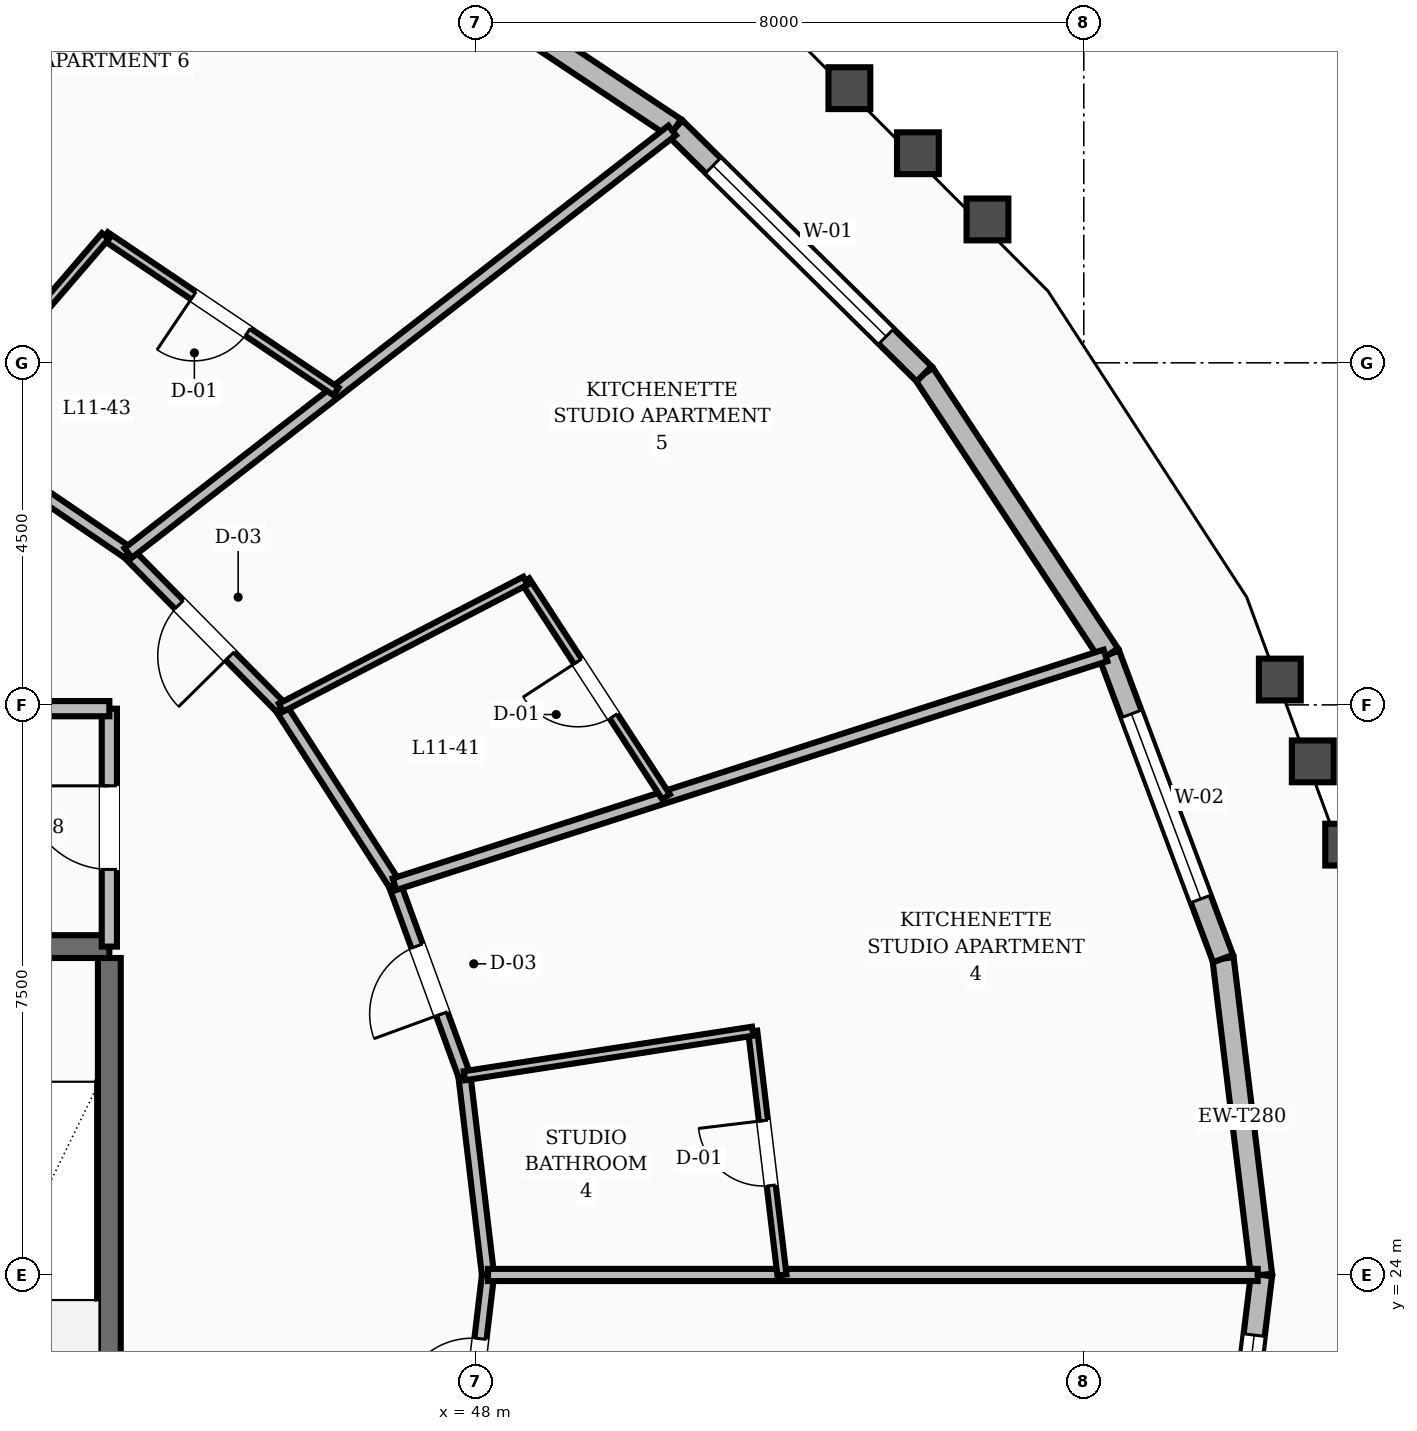
"""IFC4 building model, lengths in metres.
Left out: names, types, materials, properties, quantities, classifications, styles, units other than length and angle.
Written with IfcOpenShell. Run it as: python <this file> out.ifc"""

import sys

from ifc_helpers import new_model, si_unit, direction, frame, frame_2d, origin, place, context, subcontext, project, spatial, rectangle, extrude, element, fill, save


model = new_model("IFC4")
c1 = context("Model", 3, precision=1e-05, world=origin(), true_north=direction((0.0, 1.0)))
c2 = subcontext(c1, "Body", "Model", "MODEL_VIEW")
j1 = project(units=[si_unit("LENGTHUNIT", "METRE"), si_unit("PLANEANGLEUNIT", "RADIAN")], contexts=[c1])
p1 = place(None, origin())
s1 = spatial("IfcSite", under=j1, at=p1, CompositionType="ELEMENT")
p2 = place(p1, origin())
s2 = spatial("IfcBuilding", under=s1, at=p2, CompositionType="ELEMENT")
p3 = place(p2, frame((0.0, 0.0, 48.4)))
s3 = spatial("IfcBuildingStorey", under=s2, at=p3, CompositionType="ELEMENT", Elevation=48.4)
p4 = place(p3, frame((43.18, 19.43, 0.0), z_axis=(0.0, 0.0, 1.0), x_axis=(0.0, 1.0, 0.0)))
e1 = element("IfcWall", 1, at=p4, inside=s3, PredefinedType="SHEAR", context=c2, shape_type="SweptSolid", body=[
    extrude(rectangle(XDim=8.74, YDim=0.3, at=frame_2d((4.37, 0.0))), origin(), (0.0, 0.0, 1.0), 3.6),
])
p5 = place(p3, frame((39.58, 28.32, 0.0), z_axis=(0.0, 0.0, 1.0), x_axis=(1.0, 0.0, 0.0)))
e2 = element("IfcWall", 2, at=p5, inside=s3, PredefinedType="SHEAR", context=c2, shape_type="SweptSolid", body=[
    extrude(rectangle(XDim=3.6, YDim=0.3, at=frame_2d((1.8, 0.0))), origin(), (0.0, 0.0, 1.0), 3.6),
])
p6 = place(p5, frame((1.3, 0.0, 0.0)))
e3 = element("IfcOpeningElement", 3, at=p6, cuts=e2, PredefinedType="OPENING", context=c2, shape_type="SweptSolid", body=[
    extrude(rectangle(XDim=1.1, YDim=2.1, at=frame_2d((0.55, 1.05))), frame((0.0, 0.16, 0.0), z_axis=(0.0, -1.0, 0.0), x_axis=(1.0, 0.0, 0.0)), (0.0, 0.0, 1.0), 0.32),
])
p7 = place(p3, frame((58.338, 24.0, 0.0), z_axis=(0.0, 0.0, 1.0), x_axis=(-0.120687785898, 0.992690514881, 0.0)))
e4 = element("IfcWall", 4, at=p7, inside=s3, PredefinedType="STANDARD", context=c2, shape_type="SweptSolid", body=[
    extrude(rectangle(XDim=4.194, YDim=0.28, at=frame_2d((2.097, 0.0))), origin(), (0.0, 0.0, 1.0), 2.65),
])
p8 = place(p3, frame((57.832, 28.163, 0.0), z_axis=(0.0, 0.0, 1.0), x_axis=(-0.350647673381, 0.936507452802, 0.0)))
e5 = element("IfcWall", 5, at=p8, inside=s3, PredefinedType="STANDARD", context=c2, shape_type="SweptSolid", body=[
    extrude(rectangle(XDim=4.274, YDim=0.28, at=frame_2d((2.137, 0.0))), origin(), (0.0, 0.0, 1.0), 2.65),
])
p9 = place(p8, frame((0.837, 0.0, 0.8)))
e6 = element("IfcOpeningElement", 6, at=p9, cuts=e5, PredefinedType="OPENING", context=c2, shape_type="SweptSolid", body=[
    extrude(rectangle(XDim=2.6, YDim=1.65, at=frame_2d((1.3, 0.825))), frame((0.0, 0.15, 0.0), z_axis=(0.0, -1.0, 0.0), x_axis=(1.0, 0.0, 0.0)), (0.0, 0.0, 1.0), 0.3),
])
p10 = place(p3, frame((56.333, 32.166, 0.0), z_axis=(0.0, 0.0, 1.0), x_axis=(-0.550703673424, 0.834700823096, 0.0)))
e7 = element("IfcWall", 7, at=p10, inside=s3, PredefinedType="STANDARD", context=c2, shape_type="SweptSolid", body=[
    extrude(rectangle(XDim=4.419, YDim=0.28, at=frame_2d((2.21, 0.0))), origin(), (0.0, 0.0, 1.0), 2.65),
])
p11 = place(p3, frame((53.899, 35.855, 0.0), z_axis=(0.0, 0.0, 1.0), x_axis=(-0.711653949878, 0.70253018129, 0.0)))
e8 = element("IfcWall", 8, at=p11, inside=s3, PredefinedType="STANDARD", context=c2, shape_type="SweptSolid", body=[
    extrude(rectangle(XDim=4.603, YDim=0.28, at=frame_2d((2.301, 0.0))), origin(), (0.0, 0.0, 1.0), 2.65),
])
p12 = place(p11, frame((0.701, 0.0, 0.8)))
e9 = element("IfcOpeningElement", 9, at=p12, cuts=e8, PredefinedType="OPENING", context=c2, shape_type="SweptSolid", body=[
    extrude(rectangle(XDim=3.2, YDim=1.65, at=frame_2d((1.6, 0.825))), frame((0.0, 0.15, 0.0), z_axis=(0.0, -1.0, 0.0), x_axis=(1.0, 0.0, 0.0)), (0.0, 0.0, 1.0), 0.3),
])
p13 = place(p3, frame((50.624, 39.088, 0.0), z_axis=(0.0, 0.0, 1.0), x_axis=(-0.832723620408, 0.55368887655, 0.0)))
e10 = element("IfcWall", 10, at=p13, inside=s3, PredefinedType="STANDARD", context=c2, shape_type="SweptSolid", body=[
    extrude(rectangle(XDim=4.793, YDim=0.28, at=frame_2d((2.396, 0.0))), origin(), (0.0, 0.0, 1.0), 2.65),
])
p14 = place(p3, frame((57.832, 19.837, 0.0), z_axis=(0.0, 0.0, 1.0), x_axis=(0.120687785898, 0.992690514881, 0.0)))
e11 = element("IfcWall", 11, at=p14, inside=s3, PredefinedType="STANDARD", context=c2, shape_type="SweptSolid", body=[
    extrude(rectangle(XDim=4.194, YDim=0.28, at=frame_2d((2.097, 0.0))), origin(), (0.0, 0.0, 1.0), 2.65),
])
p15 = place(p14, frame((0.797, 0.0, 0.8)))
e12 = element("IfcOpeningElement", 12, at=p15, cuts=e11, PredefinedType="OPENING", context=c2, shape_type="SweptSolid", body=[
    extrude(rectangle(XDim=2.6, YDim=1.65, at=frame_2d((1.3, 0.825))), frame((0.0, 0.15, 0.0), z_axis=(0.0, -1.0, 0.0), x_axis=(1.0, 0.0, 0.0)), (0.0, 0.0, 1.0), 0.3),
])
p16 = place(p3, frame((43.18, 28.32, 0.0), z_axis=(0.0, 0.0, 1.0), x_axis=(0.0, 1.0, 0.0)))
e13 = element("IfcWall", 13, at=p16, inside=s3, PredefinedType="SOLIDWALL", context=c2, shape_type="SweptSolid", body=[
    extrude(rectangle(XDim=3.13, YDim=0.2, at=frame_2d((1.565, 0.0))), origin(), (0.0, 0.0, 1.0), 2.61),
])
p17 = place(p16, frame((1.015, 0.0, 0.0)))
e14 = element("IfcOpeningElement", 14, at=p17, cuts=e13, PredefinedType="OPENING", context=c2, shape_type="SweptSolid", body=[
    extrude(rectangle(XDim=1.1, YDim=2.1, at=frame_2d((0.55, 1.05))), frame((0.0, 0.11, 0.0), z_axis=(0.0, -1.0, 0.0), x_axis=(1.0, 0.0, 0.0)), (0.0, 0.0, 1.0), 0.22),
])
p18 = place(p3, frame((39.2, 31.45, 0.0), z_axis=(0.0, 0.0, 1.0), x_axis=(1.0, 0.0, 0.0)))
e15 = element("IfcWall", 15, at=p18, inside=s3, PredefinedType="SOLIDWALL", context=c2, shape_type="SweptSolid", body=[
    extrude(rectangle(XDim=3.98, YDim=0.2, at=frame_2d((1.99, 0.0))), origin(), (0.0, 0.0, 1.0), 2.61),
])
p19 = place(p3, frame((48.162, 24.0, 0.0), z_axis=(0.0, 0.0, 1.0), x_axis=(-0.117667763342, 0.993053018459, 0.0)))
e16 = element("IfcWall", 16, at=p19, inside=s3, PredefinedType="SOLIDWALL", context=c2, shape_type="SweptSolid", body=[
    extrude(rectangle(XDim=2.639, YDim=0.16, at=frame_2d((1.32, 0.0))), origin(), (0.0, 0.0, 1.0), 2.61),
])
p20 = place(p3, frame((47.852, 26.621, 0.0), z_axis=(0.0, 0.0, 1.0), x_axis=(-0.342882618672, 0.939378257047, 0.0)))
e17 = element("IfcWall", 17, at=p20, inside=s3, PredefinedType="SOLIDWALL", context=c2, shape_type="SweptSolid", body=[
    extrude(rectangle(XDim=2.683, YDim=0.16, at=frame_2d((1.341, 0.0))), origin(), (0.0, 0.0, 1.0), 2.61),
])
p21 = place(p20, frame((0.866, 0.0, 0.0)))
e18 = element("IfcOpeningElement", 18, at=p21, cuts=e17, PredefinedType="OPENING", context=c2, shape_type="SweptSolid", body=[
    extrude(rectangle(XDim=0.95, YDim=2.1, at=frame_2d((0.475, 1.05))), frame((0.0, 0.09, 0.0), z_axis=(0.0, -1.0, 0.0), x_axis=(1.0, 0.0, 0.0)), (0.0, 0.0, 1.0), 0.18),
])
p22 = place(p3, frame((46.932, 29.141, 0.0), z_axis=(0.0, 0.0, 1.0), x_axis=(-0.540891657444, 0.841092274907, 0.0)))
e19 = element("IfcWall", 19, at=p22, inside=s3, PredefinedType="SOLIDWALL", context=c2, shape_type="SweptSolid", body=[
    extrude(rectangle(XDim=2.761, YDim=0.16, at=frame_2d((1.38, 0.0))), origin(), (0.0, 0.0, 1.0), 2.61),
])
p23 = place(p3, frame((45.438, 31.463, 0.0), z_axis=(0.0, 0.0, 1.0), x_axis=(-0.702569520063, 0.711615113301, 0.0)))
e20 = element("IfcWall", 20, at=p23, inside=s3, PredefinedType="SOLIDWALL", context=c2, shape_type="SweptSolid", body=[
    extrude(rectangle(XDim=2.861, YDim=0.16, at=frame_2d((1.43, 0.0))), origin(), (0.0, 0.0, 1.0), 2.61),
])
p24 = place(p23, frame((0.955, 0.0, 0.0)))
e21 = element("IfcOpeningElement", 21, at=p24, cuts=e20, PredefinedType="OPENING", context=c2, shape_type="SweptSolid", body=[
    extrude(rectangle(XDim=0.95, YDim=2.1, at=frame_2d((0.475, 1.05))), frame((0.0, 0.09, 0.0), z_axis=(0.0, -1.0, 0.0), x_axis=(1.0, 0.0, 0.0)), (0.0, 0.0, 1.0), 0.18),
])
p25 = place(p3, frame((43.428, 33.499, 0.0), z_axis=(0.0, 0.0, 1.0), x_axis=(-0.826112340767, 0.563505457323, 0.0)))
e22 = element("IfcWall", 22, at=p25, inside=s3, PredefinedType="SOLIDWALL", context=c2, shape_type="SweptSolid", body=[
    extrude(rectangle(XDim=2.965, YDim=0.16, at=frame_2d((1.482, 0.0))), origin(), (0.0, 0.0, 1.0), 2.61),
])
p26 = place(p3, frame((47.852, 21.379, 0.0), z_axis=(0.0, 0.0, 1.0), x_axis=(0.117667763342, 0.993053018459, 0.0)))
e23 = element("IfcWall", 23, at=p26, inside=s3, PredefinedType="SOLIDWALL", context=c2, shape_type="SweptSolid", body=[
    extrude(rectangle(XDim=2.639, YDim=0.16, at=frame_2d((1.32, 0.0))), origin(), (0.0, 0.0, 1.0), 2.61),
])
p27 = place(p26, frame((0.844, 0.0, 0.0)))
e24 = element("IfcOpeningElement", 24, at=p27, cuts=e23, PredefinedType="OPENING", context=c2, shape_type="SweptSolid", body=[
    extrude(rectangle(XDim=0.95, YDim=2.1, at=frame_2d((0.475, 1.05))), frame((0.0, 0.09, 0.0), z_axis=(0.0, -1.0, 0.0), x_axis=(1.0, 0.0, 0.0)), (0.0, 0.0, 1.0), 0.18),
])
p28 = place(p3, frame((48.162, 24.0, 0.0), z_axis=(0.0, 0.0, 1.0), x_axis=(1.0, 0.0, 0.0)))
e25 = element("IfcWall", 25, at=p28, inside=s3, PredefinedType="SOLIDWALL", context=c2, shape_type="SweptSolid", body=[
    extrude(rectangle(XDim=10.126, YDim=0.16, at=frame_2d((5.063, 0.0))), origin(), (0.0, 0.0, 1.0), 2.61),
])
p29 = place(p3, frame((52.029, 24.0, 0.0), z_axis=(0.0, 0.0, 1.0), x_axis=(-0.119130317154, 0.992878626789, 0.0)))
e26 = element("IfcWall", 26, at=p29, inside=s3, PredefinedType="PARTITIONING", context=c2, shape_type="SweptSolid", body=[
    extrude(rectangle(XDim=3.23, YDim=0.12, at=frame_2d((1.615, 0.0))), origin(), (0.0, 0.0, 1.0), 2.61),
])
p30 = place(p29, frame((1.185, 0.0, 0.0)))
e27 = element("IfcOpeningElement", 27, at=p30, cuts=e26, PredefinedType="OPENING", context=c2, shape_type="SweptSolid", body=[
    extrude(rectangle(XDim=0.86, YDim=2.1, at=frame_2d((0.43, 1.05))), frame((0.0, 0.07, 0.0), z_axis=(0.0, -1.0, 0.0), x_axis=(1.0, 0.0, 0.0)), (0.0, 0.0, 1.0), 0.14),
])
p31 = place(p3, frame((47.852, 26.621, 0.0), z_axis=(0.0, 0.0, 1.0), x_axis=(0.988274411208, 0.152688205671, 0.0)))
e28 = element("IfcWall", 28, at=p31, inside=s3, PredefinedType="PARTITIONING", context=c2, shape_type="SweptSolid", body=[
    extrude(rectangle(XDim=3.837, YDim=0.12, at=frame_2d((1.919, 0.0))), origin(), (0.0, 0.0, 1.0), 2.61),
])
p32 = place(p3, frame((46.932, 29.141, 0.0), z_axis=(0.0, 0.0, 1.0), x_axis=(0.951948128821, 0.306259301956, 0.0)))
e29 = element("IfcWall", 29, at=p32, inside=s3, PredefinedType="SOLIDWALL", context=c2, shape_type="SweptSolid", body=[
    extrude(rectangle(XDim=9.826, YDim=0.16, at=frame_2d((4.913, 0.0))), origin(), (0.0, 0.0, 1.0), 2.61),
])
p33 = place(p3, frame((50.504, 30.29, 0.0), z_axis=(0.0, 0.0, 1.0), x_axis=(-0.54574723604, 0.837949851933, 0.0)))
e30 = element("IfcWall", 30, at=p33, inside=s3, PredefinedType="PARTITIONING", context=c2, shape_type="SweptSolid", body=[
    extrude(rectangle(XDim=3.391, YDim=0.12, at=frame_2d((1.696, 0.0))), origin(), (0.0, 0.0, 1.0), 2.61),
])
p34 = place(p33, frame((1.266, 0.0, 0.0)))
e31 = element("IfcOpeningElement", 31, at=p34, cuts=e30, PredefinedType="OPENING", context=c2, shape_type="SweptSolid", body=[
    extrude(rectangle(XDim=0.86, YDim=2.1, at=frame_2d((0.43, 1.05))), frame((0.0, 0.07, 0.0), z_axis=(0.0, -1.0, 0.0), x_axis=(1.0, 0.0, 0.0)), (0.0, 0.0, 1.0), 0.14),
])
p35 = place(p3, frame((45.438, 31.463, 0.0), z_axis=(0.0, 0.0, 1.0), x_axis=(0.887571866108, 0.460669276699, 0.0)))
e32 = element("IfcWall", 32, at=p35, inside=s3, PredefinedType="PARTITIONING", context=c2, shape_type="SweptSolid", body=[
    extrude(rectangle(XDim=3.622, YDim=0.12, at=frame_2d((1.811, 0.0))), origin(), (0.0, 0.0, 1.0), 2.61),
])
p36 = place(p3, frame((43.428, 33.499, 0.0), z_axis=(0.0, 0.0, 1.0), x_axis=(0.789749576514, 0.613429381751, 0.0)))
e33 = element("IfcWall", 33, at=p36, inside=s3, PredefinedType="SOLIDWALL", context=c2, shape_type="SweptSolid", body=[
    extrude(rectangle(XDim=9.061, YDim=0.16, at=frame_2d((4.531, 0.0))), origin(), (0.0, 0.0, 1.0), 2.61),
])
p37 = place(p3, frame((46.163, 35.623, 0.0), z_axis=(0.0, 0.0, 1.0), x_axis=(-0.829423679088, 0.558620050274, 0.0)))
e34 = element("IfcWall", 34, at=p37, inside=s3, PredefinedType="PARTITIONING", context=c2, shape_type="SweptSolid", body=[
    extrude(rectangle(XDim=3.659, YDim=0.12, at=frame_2d((1.83, 0.0))), origin(), (0.0, 0.0, 1.0), 2.61),
])
p38 = place(p37, frame((1.4, 0.0, 0.0)))
e35 = element("IfcOpeningElement", 35, at=p38, cuts=e34, PredefinedType="OPENING", context=c2, shape_type="SweptSolid", body=[
    extrude(rectangle(XDim=0.86, YDim=2.1, at=frame_2d((0.43, 1.05))), frame((0.0, 0.07, 0.0), z_axis=(0.0, -1.0, 0.0), x_axis=(1.0, 0.0, 0.0)), (0.0, 0.0, 1.0), 0.14),
])
p39 = place(p3, frame((40.979, 35.17, 0.0), z_axis=(0.0, 0.0, 1.0), x_axis=(0.652169620861, 0.758073074067, 0.0)))
e36 = element("IfcWall", 36, at=p39, inside=s3, PredefinedType="PARTITIONING", context=c2, shape_type="SweptSolid", body=[
    extrude(rectangle(XDim=3.294, YDim=0.12, at=frame_2d((1.647, 0.0))), origin(), (0.0, 0.0, 1.0), 2.61),
])
p40 = place(p9, origin())
e37 = element("IfcWindow", 37, at=p40, inside=s3, PartitioningType="SINGLE_PANEL", PredefinedType="WINDOW", context=c2, shape_type="SweptSolid", body=[
    extrude(rectangle(XDim=2.6, YDim=1.65, at=frame_2d((1.3, 0.825))), frame((0.0, 0.03, 0.0), z_axis=(0.0, -1.0, 0.0), x_axis=(1.0, 0.0, 0.0)), (0.0, 0.0, 1.0), 0.06),
])
fill(e6, e37)
p41 = place(p12, origin())
e38 = element("IfcWindow", 38, at=p41, inside=s3, PartitioningType="SINGLE_PANEL", PredefinedType="WINDOW", context=c2, shape_type="SweptSolid", body=[
    extrude(rectangle(XDim=3.2, YDim=1.65, at=frame_2d((1.6, 0.825))), frame((0.0, 0.03, 0.0), z_axis=(0.0, -1.0, 0.0), x_axis=(1.0, 0.0, 0.0)), (0.0, 0.0, 1.0), 0.06),
])
fill(e9, e38)
p42 = place(p15, origin())
e39 = element("IfcWindow", 39, at=p42, inside=s3, PartitioningType="SINGLE_PANEL", PredefinedType="WINDOW", context=c2, shape_type="SweptSolid", body=[
    extrude(rectangle(XDim=2.6, YDim=1.65, at=frame_2d((1.3, 0.825))), frame((0.0, 0.03, 0.0), z_axis=(0.0, -1.0, 0.0), x_axis=(1.0, 0.0, 0.0)), (0.0, 0.0, 1.0), 0.06),
])
fill(e12, e39)
p43 = place(p17, origin())
e40 = element("IfcDoor", 40, at=p43, inside=s3, OperationType="SINGLE_SWING_RIGHT", PredefinedType="DOOR", context=c2, shape_type="SweptSolid", body=[
    extrude(rectangle(XDim=1.1, YDim=2.1, at=frame_2d((0.55, 1.05))), frame((0.0, 0.025, 0.0), z_axis=(0.0, -1.0, 0.0), x_axis=(1.0, 0.0, 0.0)), (0.0, 0.0, 1.0), 0.05),
])
fill(e14, e40)
p44 = place(p27, origin())
e41 = element("IfcDoor", 41, at=p44, inside=s3, OperationType="SINGLE_SWING_LEFT", PredefinedType="DOOR", context=c2, shape_type="SweptSolid", body=[
    extrude(rectangle(XDim=0.95, YDim=2.1, at=frame_2d((0.475, 1.05))), frame((0.0, 0.025, 0.0), z_axis=(0.0, -1.0, 0.0), x_axis=(1.0, 0.0, 0.0)), (0.0, 0.0, 1.0), 0.05),
])
fill(e24, e41)
p45 = place(p30, origin())
e42 = element("IfcDoor", 42, at=p45, inside=s3, OperationType="SINGLE_SWING_RIGHT", PredefinedType="DOOR", context=c2, shape_type="SweptSolid", body=[
    extrude(rectangle(XDim=0.86, YDim=2.1, at=frame_2d((0.43, 1.05))), frame((0.0, 0.025, 0.0), z_axis=(0.0, -1.0, 0.0), x_axis=(1.0, 0.0, 0.0)), (0.0, 0.0, 1.0), 0.05),
])
fill(e27, e42)
p46 = place(p21, origin())
e43 = element("IfcDoor", 43, at=p46, inside=s3, OperationType="SINGLE_SWING_LEFT", PredefinedType="DOOR", context=c2, shape_type="SweptSolid", body=[
    extrude(rectangle(XDim=0.95, YDim=2.1, at=frame_2d((0.475, 1.05))), frame((0.0, 0.025, 0.0), z_axis=(0.0, -1.0, 0.0), x_axis=(1.0, 0.0, 0.0)), (0.0, 0.0, 1.0), 0.05),
])
fill(e18, e43)
p47 = place(p34, origin())
e44 = element("IfcDoor", 44, at=p47, inside=s3, OperationType="SINGLE_SWING_RIGHT", PredefinedType="DOOR", context=c2, shape_type="SweptSolid", body=[
    extrude(rectangle(XDim=0.86, YDim=2.1, at=frame_2d((0.43, 1.05))), frame((0.0, 0.025, 0.0), z_axis=(0.0, -1.0, 0.0), x_axis=(1.0, 0.0, 0.0)), (0.0, 0.0, 1.0), 0.05),
])
fill(e31, e44)
p48 = place(p24, origin())
e45 = element("IfcDoor", 45, at=p48, inside=s3, OperationType="SINGLE_SWING_LEFT", PredefinedType="DOOR", context=c2, shape_type="SweptSolid", body=[
    extrude(rectangle(XDim=0.95, YDim=2.1, at=frame_2d((0.475, 1.05))), frame((0.0, 0.025, 0.0), z_axis=(0.0, -1.0, 0.0), x_axis=(1.0, 0.0, 0.0)), (0.0, 0.0, 1.0), 0.05),
])
fill(e21, e45)
p49 = place(p38, origin())
e46 = element("IfcDoor", 46, at=p49, inside=s3, OperationType="SINGLE_SWING_RIGHT", PredefinedType="DOOR", context=c2, shape_type="SweptSolid", body=[
    extrude(rectangle(XDim=0.86, YDim=2.1, at=frame_2d((0.43, 1.05))), frame((0.0, 0.025, 0.0), z_axis=(0.0, -1.0, 0.0), x_axis=(1.0, 0.0, 0.0)), (0.0, 0.0, 1.0), 0.05),
])
fill(e35, e46)
save(model, sys.argv[1])
